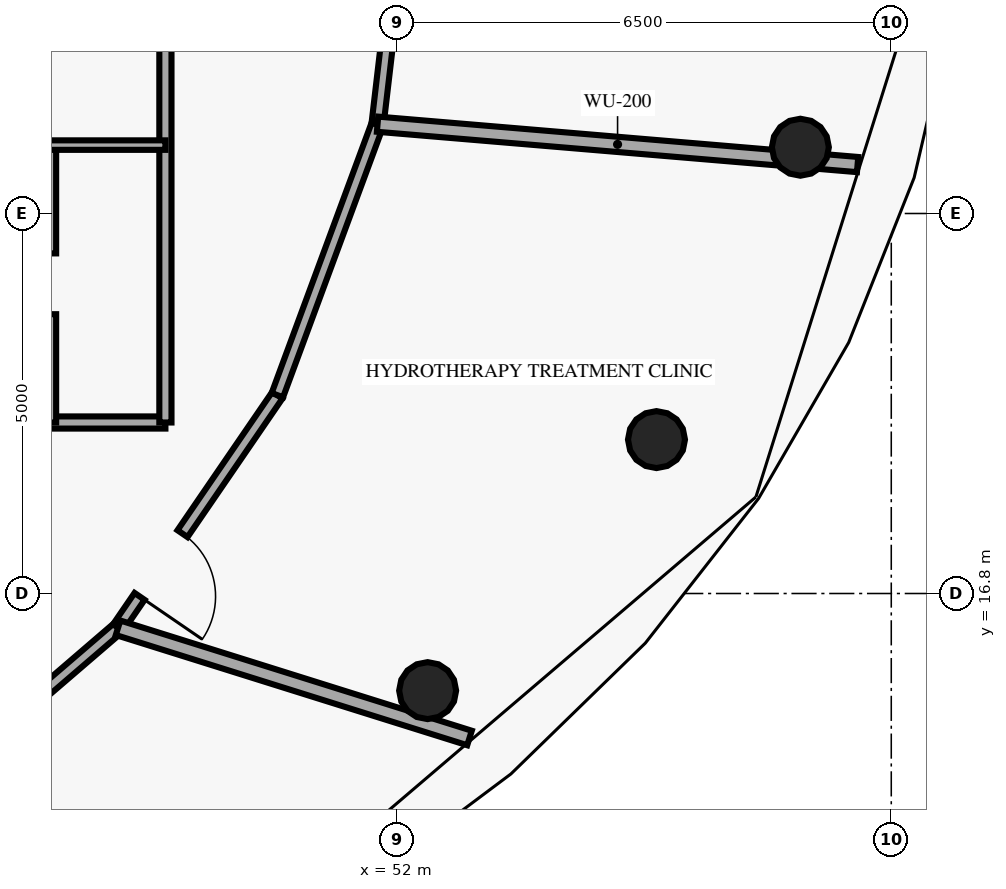
"""IFC4 building model, lengths in metres.
Left out: names, types, materials, properties, quantities, classifications, styles, units other than length and angle.
Written with IfcOpenShell. Run it as: python <this file> out.ifc"""

import sys

from ifc_helpers import new_model, si_unit, direction, frame, frame_2d, origin, origin_2d, place, context, subcontext, project, spatial, rectangle, circle, extrude, element, fill, save


model = new_model("IFC4")
c1 = context("Model", 3, precision=1e-05, world=origin(), true_north=direction((0.0, 1.0)))
c2 = subcontext(c1, "Body", "Model", "MODEL_VIEW")
j1 = project(units=[si_unit("LENGTHUNIT", "METRE"), si_unit("PLANEANGLEUNIT", "RADIAN")], contexts=[c1])
p1 = place(None, origin())
s1 = spatial("IfcSite", under=j1, at=p1, CompositionType="ELEMENT")
p2 = place(p1, origin())
s2 = spatial("IfcBuilding", under=s1, at=p2, CompositionType="ELEMENT")
p3 = place(p2, frame((0.0, 0.0, 297.4)))
s3 = spatial("IfcBuildingStorey", under=s2, at=p3, CompositionType="ELEMENT", Elevation=297.4)
for number, where, z_axis, x_axis in (
    (1, (52.4, 15.522, 0.0), (0.0, 0.0, 1.0), (1.0, 0.0, 0.0)),
    (2, (55.411, 18.825, 0.0), (0.0, 0.0, 1.0), (1.0, 0.0, 0.0)),
    (3, (57.304, 22.672, 0.0), (0.0, 0.0, 1.0), (1.0, 0.0, 0.0)),
):
    element("IfcColumn", number, at=place(p3, frame(where, z_axis=z_axis, x_axis=x_axis)), inside=s3, PredefinedType="COLUMN", context=c2, shape_type="SweptSolid", body=[
        extrude(circle(Radius=0.375, at=origin_2d()), origin(), (0.0, 0.0, 1.0), 3.45),
    ])
p4 = place(p3, frame((45.9, 19.05, 0.0), z_axis=(0.0, 0.0, 1.0), x_axis=(1.0, 0.0, 0.0)))
e4 = element("IfcWall", 4, at=p4, inside=s3, PredefinedType="PARTITIONING", context=c2, shape_type="SweptSolid", body=[
    extrude(rectangle(XDim=3.05, YDim=0.16, at=frame_2d((1.525, 0.0))), origin(), (0.0, 0.0, 1.0), 3.45),
])
p5 = place(p3, frame((48.95, 19.05, 0.0), z_axis=(0.0, 0.0, 1.0), x_axis=(0.0, 1.0, 0.0)))
e5 = element("IfcWall", 5, at=p5, inside=s3, PredefinedType="PARTITIONING", context=c2, shape_type="SweptSolid", body=[
    extrude(rectangle(XDim=7.07, YDim=0.16, at=frame_2d((3.535, 0.0))), origin(), (0.0, 0.0, 1.0), 3.45),
])
p6 = place(p3, frame((47.45, 22.7, 0.0), z_axis=(0.0, 0.0, 1.0), x_axis=(0.0, -1.0, 0.0)))
e6 = element("IfcWall", 6, at=p6, inside=s3, PredefinedType="PARTITIONING", context=c2, shape_type="SweptSolid", body=[
    extrude(rectangle(XDim=3.65, YDim=0.125, at=frame_2d((1.825, 0.0))), origin(), (0.0, 0.0, 1.0), 3.45),
])
p7 = place(p6, frame((1.425, 0.0, 0.0)))
e7 = element("IfcOpeningElement", 7, at=p7, cuts=e6, PredefinedType="OPENING", context=c2, shape_type="SweptSolid", body=[
    extrude(rectangle(XDim=0.8, YDim=2.05, at=frame_2d((0.4, 1.025))), frame((0.0, 0.073, 0.0), z_axis=(0.0, -1.0, 0.0), x_axis=(1.0, 0.0, 0.0)), (0.0, 0.0, 1.0), 0.145),
])
p8 = place(p3, frame((48.95, 22.7, 0.0), z_axis=(0.0, 0.0, 1.0), x_axis=(-1.0, 0.0, 0.0)))
e8 = element("IfcWall", 8, at=p8, inside=s3, PredefinedType="PARTITIONING", context=c2, shape_type="SweptSolid", body=[
    extrude(rectangle(XDim=3.05, YDim=0.125, at=frame_2d((1.525, 0.0))), origin(), (0.0, 0.0, 1.0), 3.45),
])
p9 = place(p8, frame((2.0, 0.0, 0.0)))
e9 = element("IfcOpeningElement", 9, at=p9, cuts=e8, PredefinedType="OPENING", context=c2, shape_type="SweptSolid", body=[
    extrude(rectangle(XDim=0.8, YDim=2.05, at=frame_2d((0.4, 1.025))), frame((0.0, 0.073, 0.0), z_axis=(0.0, -1.0, 0.0), x_axis=(1.0, 0.0, 0.0)), (0.0, 0.0, 1.0), 0.145),
])
p10 = place(p3, frame((45.595, 14.0, 0.0), z_axis=(0.0, 0.0, 1.0), x_axis=(0.758232091793, 0.651984735231, 0.0)))
e10 = element("IfcWall", 10, at=p10, inside=s3, PredefinedType="PARTITIONING", context=c2, shape_type="SweptSolid", body=[
    extrude(rectangle(XDim=3.603, YDim=0.16, at=frame_2d((1.802, 0.0))), origin(), (0.0, 0.0, 1.0), 3.45),
])
p11 = place(p3, frame((50.423, 19.41, 0.0), z_axis=(0.0, 0.0, 1.0), x_axis=(-0.565044823329, -0.825060208487, 0.0)))
e11 = element("IfcWall", 11, at=p11, inside=s3, PredefinedType="PARTITIONING", context=c2, shape_type="SweptSolid", body=[
    extrude(rectangle(XDim=3.71, YDim=0.16, at=frame_2d((1.855, 0.0))), origin(), (0.0, 0.0, 1.0), 3.45),
])
p12 = place(p11, frame((2.209, 0.0, 0.0)))
e12 = element("IfcOpeningElement", 12, at=p12, cuts=e11, PredefinedType="OPENING", context=c2, shape_type="SweptSolid", body=[
    extrude(rectangle(XDim=1.0, YDim=2.15, at=frame_2d((0.5, 1.075))), frame((0.0, 0.09, 0.0), z_axis=(0.0, -1.0, 0.0), x_axis=(1.0, 0.0, 0.0)), (0.0, 0.0, 1.0), 0.18),
])
p13 = place(p3, frame((50.423, 19.41, 0.0), z_axis=(0.0, 0.0, 1.0), x_axis=(0.346720166633, 0.937968616773, 0.0)))
e13 = element("IfcWall", 13, at=p13, inside=s3, PredefinedType="PARTITIONING", context=c2, shape_type="SweptSolid", body=[
    extrude(rectangle(XDim=3.801, YDim=0.16, at=frame_2d((1.9, 0.0))), origin(), (0.0, 0.0, 1.0), 3.45),
])
p14 = place(p3, frame((52.19, 26.8, 0.0), z_axis=(0.0, 0.0, 1.0), x_axis=(-0.116580098154, -0.993181292974, 0.0)))
e14 = element("IfcWall", 14, at=p14, inside=s3, PredefinedType="PARTITIONING", context=c2, shape_type="SweptSolid", body=[
    extrude(rectangle(XDim=3.851, YDim=0.16, at=frame_2d((1.926, 0.0))), origin(), (0.0, 0.0, 1.0), 3.45),
])
p15 = place(p14, frame((1.426, 0.0, 0.0)))
e15 = element("IfcOpeningElement", 15, at=p15, cuts=e14, PredefinedType="OPENING", context=c2, shape_type="SweptSolid", body=[
    extrude(rectangle(XDim=1.0, YDim=2.15, at=frame_2d((0.5, 1.075))), frame((0.0, 0.09, 0.0), z_axis=(0.0, -1.0, 0.0), x_axis=(1.0, 0.0, 0.0)), (0.0, 0.0, 1.0), 0.18),
])
p16 = place(p3, frame((48.327, 16.349, 0.0), z_axis=(0.0, 0.0, 1.0), x_axis=(0.954174696895, -0.299250142532, 0.0)))
e16 = element("IfcWall", 16, at=p16, inside=s3, PredefinedType="PARTITIONING", context=c2, shape_type="SweptSolid", body=[
    extrude(rectangle(XDim=4.846, YDim=0.2, at=frame_2d((2.423, 0.0))), origin(), (0.0, 0.0, 1.0), 3.45),
])
p17 = place(p3, frame((51.741, 22.975, 0.0), z_axis=(0.0, 0.0, 1.0), x_axis=(0.996484389559, -0.083778645044, 0.0)))
e17 = element("IfcWall", 17, at=p17, inside=s3, PredefinedType="PARTITIONING", context=c2, shape_type="SweptSolid", body=[
    extrude(rectangle(XDim=6.338, YDim=0.2, at=frame_2d((3.169, 0.0))), origin(), (0.0, 0.0, 1.0), 3.45),
])
p18 = place(p7, origin())
e18 = element("IfcDoor", 18, at=p18, inside=s3, OperationType="SINGLE_SWING_LEFT", PredefinedType="DOOR", context=c2, shape_type="SweptSolid", body=[
    extrude(rectangle(XDim=0.8, YDim=2.05, at=frame_2d((0.4, 1.025))), frame((0.0, 0.025, 0.0), z_axis=(0.0, -1.0, 0.0), x_axis=(1.0, 0.0, 0.0)), (0.0, 0.0, 1.0), 0.05),
])
fill(e7, e18)
p19 = place(p12, origin())
e19 = element("IfcDoor", 19, at=p19, inside=s3, OperationType="SINGLE_SWING_RIGHT", PredefinedType="DOOR", context=c2, shape_type="SweptSolid", body=[
    extrude(rectangle(XDim=1.0, YDim=2.15, at=frame_2d((0.5, 1.075))), frame((0.0, 0.025, 0.0), z_axis=(0.0, -1.0, 0.0), x_axis=(1.0, 0.0, 0.0)), (0.0, 0.0, 1.0), 0.05),
])
fill(e12, e19)
save(model, sys.argv[1])
